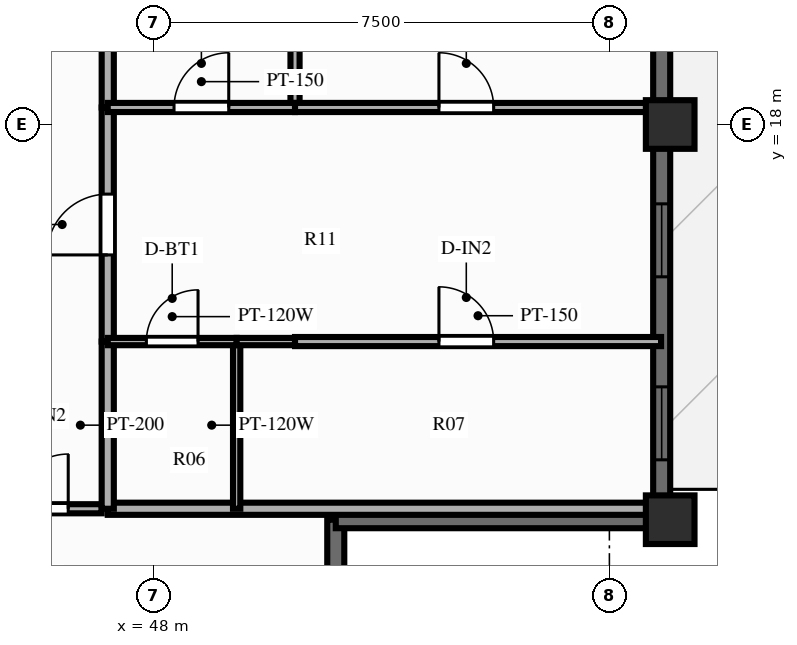
"""IFC4 building model, lengths in metres.
Left out: names, types, materials, properties, quantities, classifications, styles, units other than length and angle.
Written with IfcOpenShell. Run it as: python <this file> out.ifc"""

import sys

from ifc_helpers import new_model, si_unit, direction, frame, frame_2d, origin, origin_2d, place, context, subcontext, project, spatial, rectangle, extrude, source, transform, mapped, element, fill, save


model = new_model("IFC4")
c1 = context("Model", 3, precision=1e-05, world=origin(), true_north=direction((0.0, 1.0)))
c2 = subcontext(c1, "Body", "Model", "MODEL_VIEW")
j1 = project(units=[si_unit("LENGTHUNIT", "METRE"), si_unit("PLANEANGLEUNIT", "RADIAN")], contexts=[c1])
p1 = place(None, origin())
s1 = spatial("IfcSite", under=j1, at=p1, CompositionType="ELEMENT")
p2 = place(p1, origin())
s2 = spatial("IfcBuilding", under=s1, at=p2, CompositionType="ELEMENT")
p3 = place(p2, frame((0.0, 0.0, 199.6)))
s3 = spatial("IfcBuildingStorey", under=s2, at=p3, CompositionType="ELEMENT", Elevation=199.6)
m1 = source(origin(), c2, "Body", "SweptSolid", [
    extrude(rectangle(XDim=0.8, YDim=0.8, at=origin_2d()), origin(), (0.0, 0.0, 1.0), 3.0),
])
for number, where, z_axis, x_axis in (
    (1, (56.5, 11.5, 0.0), (0.0, 0.0, 1.0), (1.0, 0.0, 0.0)),
    (2, (56.5, 18.0, 0.0), (0.0, 0.0, 1.0), (1.0, 0.0, 0.0)),
):
    element("IfcColumn", number, at=place(p3, frame(where, z_axis=z_axis, x_axis=x_axis)), inside=s3, PredefinedType="COLUMN", context=c2, shape_type="MappedRepresentation", body=[
        mapped(m1, transform((0.0, 0.0, 0.0), scale=1.0)),
    ])
p4 = place(p3, frame((56.36, 11.5, 0.0), z_axis=(0.0, 0.0, 1.0), x_axis=(0.0, 1.0, 0.0)))
e3 = element("IfcWall", 3, at=p4, inside=s3, PredefinedType="SOLIDWALL", context=c2, shape_type="SweptSolid", body=[
    extrude(rectangle(XDim=31.0, YDim=0.28, at=frame_2d((15.5, 0.0))), origin(), (0.0, 0.0, 1.0), 2.28),
])
p5 = place(p4, frame((0.985, 0.0, 0.25)))
e4 = element("IfcOpeningElement", 4, at=p5, cuts=e3, PredefinedType="OPENING", context=c2, shape_type="SweptSolid", body=[
    extrude(rectangle(XDim=1.2, YDim=1.5, at=frame_2d((0.6, 0.75))), frame((0.0, 0.152, 0.0), z_axis=(0.0, -1.0, 0.0), x_axis=(1.0, 0.0, 0.0)), (0.0, 0.0, 1.0), 0.304),
])
p6 = place(p4, frame((3.995, 0.0, 0.25)))
e5 = element("IfcOpeningElement", 5, at=p6, cuts=e3, PredefinedType="OPENING", context=c2, shape_type="SweptSolid", body=[
    extrude(rectangle(XDim=1.2, YDim=1.5, at=frame_2d((0.6, 0.75))), frame((0.0, 0.152, 0.0), z_axis=(0.0, -1.0, 0.0), x_axis=(1.0, 0.0, 0.0)), (0.0, 0.0, 1.0), 0.304),
])
p7 = place(p4, frame((8.089, 0.0, 0.25)))
e6 = element("IfcOpeningElement", 6, at=p7, cuts=e3, PredefinedType="OPENING", context=c2, shape_type="SweptSolid", body=[
    extrude(rectangle(XDim=1.2, YDim=1.5, at=frame_2d((0.6, 0.75))), frame((0.0, 0.152, 0.0), z_axis=(0.0, -1.0, 0.0), x_axis=(1.0, 0.0, 0.0)), (0.0, 0.0, 1.0), 0.304),
])
p8 = place(p4, frame((11.373, 0.0, 0.25)))
e7 = element("IfcOpeningElement", 7, at=p8, cuts=e3, PredefinedType="OPENING", context=c2, shape_type="SweptSolid", body=[
    extrude(rectangle(XDim=1.2, YDim=1.5, at=frame_2d((0.6, 0.75))), frame((0.0, 0.152, 0.0), z_axis=(0.0, -1.0, 0.0), x_axis=(1.0, 0.0, 0.0)), (0.0, 0.0, 1.0), 0.304),
])
p9 = place(p4, frame((15.907, 0.0, 0.0), z_axis=(0.0, 0.0, 1.0), x_axis=(-1.0, 0.0, 0.0)))
e8 = element("IfcOpeningElement", 8, at=p9, cuts=e3, PredefinedType="OPENING", context=c2, shape_type="SweptSolid", body=[
    extrude(rectangle(XDim=1.6, YDim=2.15, at=frame_2d((0.8, 1.075))), frame((0.0, 0.152, 0.0), z_axis=(0.0, -1.0, 0.0), x_axis=(1.0, 0.0, 0.0)), (0.0, 0.0, 1.0), 0.304),
])
p10 = place(p4, frame((18.188, 0.0, 0.25)))
e9 = element("IfcOpeningElement", 9, at=p10, cuts=e3, PredefinedType="OPENING", context=c2, shape_type="SweptSolid", body=[
    extrude(rectangle(XDim=1.2, YDim=1.5, at=frame_2d((0.6, 0.75))), frame((0.0, 0.152, 0.0), z_axis=(0.0, -1.0, 0.0), x_axis=(1.0, 0.0, 0.0)), (0.0, 0.0, 1.0), 0.304),
])
p11 = place(p4, frame((21.484, 0.0, 0.25)))
e10 = element("IfcOpeningElement", 10, at=p11, cuts=e3, PredefinedType="OPENING", context=c2, shape_type="SweptSolid", body=[
    extrude(rectangle(XDim=1.2, YDim=1.5, at=frame_2d((0.6, 0.75))), frame((0.0, 0.152, 0.0), z_axis=(0.0, -1.0, 0.0), x_axis=(1.0, 0.0, 0.0)), (0.0, 0.0, 1.0), 0.304),
])
p12 = place(p4, frame((25.259, 0.0, 0.25)))
e11 = element("IfcOpeningElement", 11, at=p12, cuts=e3, PredefinedType="OPENING", context=c2, shape_type="SweptSolid", body=[
    extrude(rectangle(XDim=1.2, YDim=1.5, at=frame_2d((0.6, 0.75))), frame((0.0, 0.152, 0.0), z_axis=(0.0, -1.0, 0.0), x_axis=(1.0, 0.0, 0.0)), (0.0, 0.0, 1.0), 0.304),
])
p13 = place(p4, frame((28.269, 0.0, 0.25)))
e12 = element("IfcOpeningElement", 12, at=p13, cuts=e3, PredefinedType="OPENING", context=c2, shape_type="SweptSolid", body=[
    extrude(rectangle(XDim=1.2, YDim=1.5, at=frame_2d((0.6, 0.75))), frame((0.0, 0.152, 0.0), z_axis=(0.0, -1.0, 0.0), x_axis=(1.0, 0.0, 0.0)), (0.0, 0.0, 1.0), 0.304),
])
for number, where, z_axis, x_axis in (
    (13, (51.0, 6.08, 0.0), (0.0, 0.0, 1.0), (0.0, 1.0, 0.0)),
    (14, (51.0, 11.5, 0.0), (0.0, 0.0, 1.0), (1.0, 0.0, 0.0)),
):
    element("IfcWall", number, at=place(p3, frame(where, z_axis=z_axis, x_axis=x_axis)), inside=s3, PredefinedType="SOLIDWALL", context=c2, shape_type="SweptSolid", body=[
        extrude(rectangle(XDim=5.42, YDim=0.28, at=frame_2d((2.71, 0.0))), origin(), (0.0, 0.0, 1.0), 2.28),
    ])
p14 = place(p3, frame((44.82, 11.68, 0.0), z_axis=(0.0, 0.0, 1.0), x_axis=(1.0, 0.0, 0.0)))
e15 = element("IfcWall", 15, at=p14, inside=s3, PredefinedType="PARTITIONING", context=c2, shape_type="SweptSolid", body=[
    extrude(rectangle(XDim=2.33, YDim=0.15, at=frame_2d((1.165, 0.0))), origin(), (0.0, 0.0, 1.0), 2.79),
])
p15 = place(p14, frame((0.88, 0.0, 0.0)))
e16 = element("IfcOpeningElement", 16, at=p15, cuts=e15, PredefinedType="OPENING", context=c2, shape_type="SweptSolid", body=[
    extrude(rectangle(XDim=0.9, YDim=2.1, at=frame_2d((0.45, 1.05))), frame((0.0, 0.087, 0.0), z_axis=(0.0, -1.0, 0.0), x_axis=(1.0, 0.0, 0.0)), (0.0, 0.0, 1.0), 0.174),
])
p16 = place(p3, frame((47.25, 11.68, 0.0), z_axis=(0.0, 0.0, 1.0), x_axis=(1.0, 0.0, 0.0)))
e17 = element("IfcWall", 17, at=p16, inside=s3, PredefinedType="PARTITIONING", context=c2, shape_type="SweptSolid", body=[
    extrude(rectangle(XDim=9.1, YDim=0.2, at=frame_2d((4.55, 0.0))), origin(), (0.0, 0.0, 1.0), 2.79),
])
p17 = place(p3, frame((47.25, 11.68, 0.0), z_axis=(0.0, 0.0, 1.0), x_axis=(0.0, 1.0, 0.0)))
e18 = element("IfcWall", 18, at=p17, inside=s3, PredefinedType="PARTITIONING", context=c2, shape_type="SweptSolid", body=[
    extrude(rectangle(XDim=2.75, YDim=0.2, at=frame_2d((1.375, 0.0))), origin(), (0.0, 0.0, 1.0), 2.79),
])
p18 = place(p3, frame((47.25, 14.43, 0.0), z_axis=(0.0, 0.0, 1.0), x_axis=(0.0, 1.0, 0.0)))
e19 = element("IfcWall", 19, at=p18, inside=s3, PredefinedType="PARTITIONING", context=c2, shape_type="SweptSolid", body=[
    extrude(rectangle(XDim=3.85, YDim=0.2, at=frame_2d((1.925, 0.0))), origin(), (0.0, 0.0, 1.0), 2.79),
])
p19 = place(p18, frame((1.425, 0.0, 0.0)))
e20 = element("IfcOpeningElement", 20, at=p19, cuts=e19, PredefinedType="OPENING", context=c2, shape_type="SweptSolid", body=[
    extrude(rectangle(XDim=1.0, YDim=2.15, at=frame_2d((0.5, 1.075))), frame((0.0, 0.112, 0.0), z_axis=(0.0, -1.0, 0.0), x_axis=(1.0, 0.0, 0.0)), (0.0, 0.0, 1.0), 0.224),
])
p20 = place(p3, frame((47.25, 18.28, 0.0), z_axis=(0.0, 0.0, 1.0), x_axis=(0.0, 1.0, 0.0)))
e21 = element("IfcWall", 21, at=p20, inside=s3, PredefinedType="PARTITIONING", context=c2, shape_type="SweptSolid", body=[
    extrude(rectangle(XDim=3.818, YDim=0.2, at=frame_2d((1.909, 0.0))), origin(), (0.0, 0.0, 1.0), 2.79),
])
p21 = place(p3, frame((49.37, 11.68, 0.0), z_axis=(0.0, 0.0, 1.0), x_axis=(0.0, 1.0, 0.0)))
e22 = element("IfcWall", 22, at=p21, inside=s3, PredefinedType="PARTITIONING", context=c2, shape_type="SweptSolid", body=[
    extrude(rectangle(XDim=2.75, YDim=0.12, at=frame_2d((1.375, 0.0))), origin(), (0.0, 0.0, 1.0), 2.79),
])
p22 = place(p3, frame((50.33, 18.28, 0.0), z_axis=(0.0, 0.0, 1.0), x_axis=(0.0, 1.0, 0.0)))
e23 = element("IfcWall", 23, at=p22, inside=s3, PredefinedType="PARTITIONING", context=c2, shape_type="SweptSolid", body=[
    extrude(rectangle(XDim=3.818, YDim=0.15, at=frame_2d((1.909, 0.0))), origin(), (0.0, 0.0, 1.0), 2.49),
])
p23 = place(p3, frame((47.25, 14.43, 0.0), z_axis=(0.0, 0.0, 1.0), x_axis=(1.0, 0.0, 0.0)))
e24 = element("IfcWall", 24, at=p23, inside=s3, PredefinedType="PARTITIONING", context=c2, shape_type="SweptSolid", body=[
    extrude(rectangle(XDim=2.12, YDim=0.12, at=frame_2d((1.06, 0.0))), origin(), (0.0, 0.0, 1.0), 2.79),
])
p24 = place(p23, frame((0.635, 0.0, 0.0)))
e25 = element("IfcOpeningElement", 25, at=p24, cuts=e24, PredefinedType="OPENING", context=c2, shape_type="SweptSolid", body=[
    extrude(rectangle(XDim=0.85, YDim=2.05, at=frame_2d((0.425, 1.025))), frame((0.0, 0.072, 0.0), z_axis=(0.0, -1.0, 0.0), x_axis=(1.0, 0.0, 0.0)), (0.0, 0.0, 1.0), 0.144),
])
p25 = place(p3, frame((49.37, 14.43, 0.0), z_axis=(0.0, 0.0, 1.0), x_axis=(1.0, 0.0, 0.0)))
e26 = element("IfcWall", 26, at=p25, inside=s3, PredefinedType="PARTITIONING", context=c2, shape_type="SweptSolid", body=[
    extrude(rectangle(XDim=0.96, YDim=0.12, at=frame_2d((0.48, 0.0))), origin(), (0.0, 0.0, 1.0), 2.79),
])
p26 = place(p3, frame((50.33, 14.43, 0.0), z_axis=(0.0, 0.0, 1.0), x_axis=(1.0, 0.0, 0.0)))
e27 = element("IfcWall", 27, at=p26, inside=s3, PredefinedType="PARTITIONING", context=c2, shape_type="SweptSolid", body=[
    extrude(rectangle(XDim=6.02, YDim=0.15, at=frame_2d((3.01, 0.0))), origin(), (0.0, 0.0, 1.0), 2.79),
])
p27 = place(p26, frame((2.367, 0.0, 0.0)))
e28 = element("IfcOpeningElement", 28, at=p27, cuts=e27, PredefinedType="OPENING", context=c2, shape_type="SweptSolid", body=[
    extrude(rectangle(XDim=0.9, YDim=2.1, at=frame_2d((0.45, 1.05))), frame((0.0, 0.087, 0.0), z_axis=(0.0, -1.0, 0.0), x_axis=(1.0, 0.0, 0.0)), (0.0, 0.0, 1.0), 0.174),
])
p28 = place(p3, frame((47.25, 18.28, 0.0), z_axis=(0.0, 0.0, 1.0), x_axis=(1.0, 0.0, 0.0)))
e29 = element("IfcWall", 29, at=p28, inside=s3, PredefinedType="PARTITIONING", context=c2, shape_type="SweptSolid", body=[
    extrude(rectangle(XDim=3.08, YDim=0.15, at=frame_2d((1.54, 0.0))), origin(), (0.0, 0.0, 1.0), 2.79),
])
p29 = place(p28, frame((1.09, 0.0, 0.0)))
e30 = element("IfcOpeningElement", 30, at=p29, cuts=e29, PredefinedType="OPENING", context=c2, shape_type="SweptSolid", body=[
    extrude(rectangle(XDim=0.9, YDim=2.1, at=frame_2d((0.45, 1.05))), frame((0.0, 0.087, 0.0), z_axis=(0.0, -1.0, 0.0), x_axis=(1.0, 0.0, 0.0)), (0.0, 0.0, 1.0), 0.174),
])
p30 = place(p3, frame((50.33, 18.28, 0.0), z_axis=(0.0, 0.0, 1.0), x_axis=(1.0, 0.0, 0.0)))
e31 = element("IfcWall", 31, at=p30, inside=s3, PredefinedType="PARTITIONING", context=c2, shape_type="SweptSolid", body=[
    extrude(rectangle(XDim=6.02, YDim=0.15, at=frame_2d((3.01, 0.0))), origin(), (0.0, 0.0, 1.0), 2.79),
])
p31 = place(p30, frame((2.367, 0.0, 0.0)))
e32 = element("IfcOpeningElement", 32, at=p31, cuts=e31, PredefinedType="OPENING", context=c2, shape_type="SweptSolid", body=[
    extrude(rectangle(XDim=0.9, YDim=2.1, at=frame_2d((0.45, 1.05))), frame((0.0, 0.087, 0.0), z_axis=(0.0, -1.0, 0.0), x_axis=(1.0, 0.0, 0.0)), (0.0, 0.0, 1.0), 0.174),
])
m2 = source(origin(), c2, "Body", "SweptSolid", [
    extrude(rectangle(XDim=1.2, YDim=1.5, at=frame_2d((0.6, 0.75))), frame((0.0, 0.03, 0.0), z_axis=(0.0, -1.0, 0.0), x_axis=(1.0, 0.0, 0.0)), (0.0, 0.0, 1.0), 0.06),
])
p32 = place(p5, origin())
e33 = element("IfcWindow", 33, at=p32, inside=s3, PartitioningType="SINGLE_PANEL", PredefinedType="WINDOW", context=c2, shape_type="MappedRepresentation", body=[
    mapped(m2, transform((0.0, 0.0, 0.0), scale=1.0)),
])
fill(e4, e33)
p33 = place(p6, origin())
e34 = element("IfcWindow", 34, at=p33, inside=s3, PartitioningType="SINGLE_PANEL", PredefinedType="WINDOW", context=c2, shape_type="MappedRepresentation", body=[
    mapped(m2, transform((0.0, 0.0, 0.0), scale=1.0)),
])
fill(e5, e34)
m3 = source(origin(), c2, "Body", "SweptSolid", [
    extrude(rectangle(XDim=0.9, YDim=2.1, at=frame_2d((0.45, 1.05))), frame((0.0, 0.025, 0.0), z_axis=(0.0, -1.0, 0.0), x_axis=(1.0, 0.0, 0.0)), (0.0, 0.0, 1.0), 0.05),
])
p34 = place(p15, origin())
e35 = element("IfcDoor", 35, at=p34, inside=s3, OperationType="SINGLE_SWING_RIGHT", PredefinedType="DOOR", context=c2, shape_type="MappedRepresentation", body=[
    mapped(m3, transform((0.0, 0.0, 0.0), scale=1.0)),
])
fill(e16, e35)
m4 = source(origin(), c2, "Body", "SweptSolid", [
    extrude(rectangle(XDim=1.0, YDim=2.15, at=frame_2d((0.5, 1.075))), frame((0.0, 0.025, 0.0), z_axis=(0.0, -1.0, 0.0), x_axis=(1.0, 0.0, 0.0)), (0.0, 0.0, 1.0), 0.05),
])
p35 = place(p19, origin())
e36 = element("IfcDoor", 36, at=p35, inside=s3, OperationType="SINGLE_SWING_LEFT", PredefinedType="DOOR", context=c2, shape_type="MappedRepresentation", body=[
    mapped(m4, transform((0.0, 0.0, 0.0), scale=1.0)),
])
fill(e20, e36)
m5 = source(origin(), c2, "Body", "SweptSolid", [
    extrude(rectangle(XDim=0.85, YDim=2.05, at=frame_2d((0.425, 1.025))), frame((0.0, 0.025, 0.0), z_axis=(0.0, -1.0, 0.0), x_axis=(1.0, 0.0, 0.0)), (0.0, 0.0, 1.0), 0.05),
])
p36 = place(p24, origin())
e37 = element("IfcDoor", 37, at=p36, inside=s3, OperationType="SINGLE_SWING_RIGHT", PredefinedType="DOOR", context=c2, shape_type="MappedRepresentation", body=[
    mapped(m5, transform((0.0, 0.0, 0.0), scale=1.0)),
])
fill(e25, e37)
p37 = place(p27, origin())
e38 = element("IfcDoor", 38, at=p37, inside=s3, OperationType="SINGLE_SWING_LEFT", PredefinedType="DOOR", context=c2, shape_type="MappedRepresentation", body=[
    mapped(m3, transform((0.0, 0.0, 0.0), scale=1.0)),
])
fill(e28, e38)
p38 = place(p29, origin())
e39 = element("IfcDoor", 39, at=p38, inside=s3, OperationType="SINGLE_SWING_RIGHT", PredefinedType="DOOR", context=c2, shape_type="MappedRepresentation", body=[
    mapped(m3, transform((0.0, 0.0, 0.0), scale=1.0)),
])
fill(e30, e39)
p39 = place(p31, origin())
e40 = element("IfcDoor", 40, at=p39, inside=s3, OperationType="SINGLE_SWING_LEFT", PredefinedType="DOOR", context=c2, shape_type="MappedRepresentation", body=[
    mapped(m3, transform((0.0, 0.0, 0.0), scale=1.0)),
])
fill(e32, e40)
save(model, sys.argv[1])
